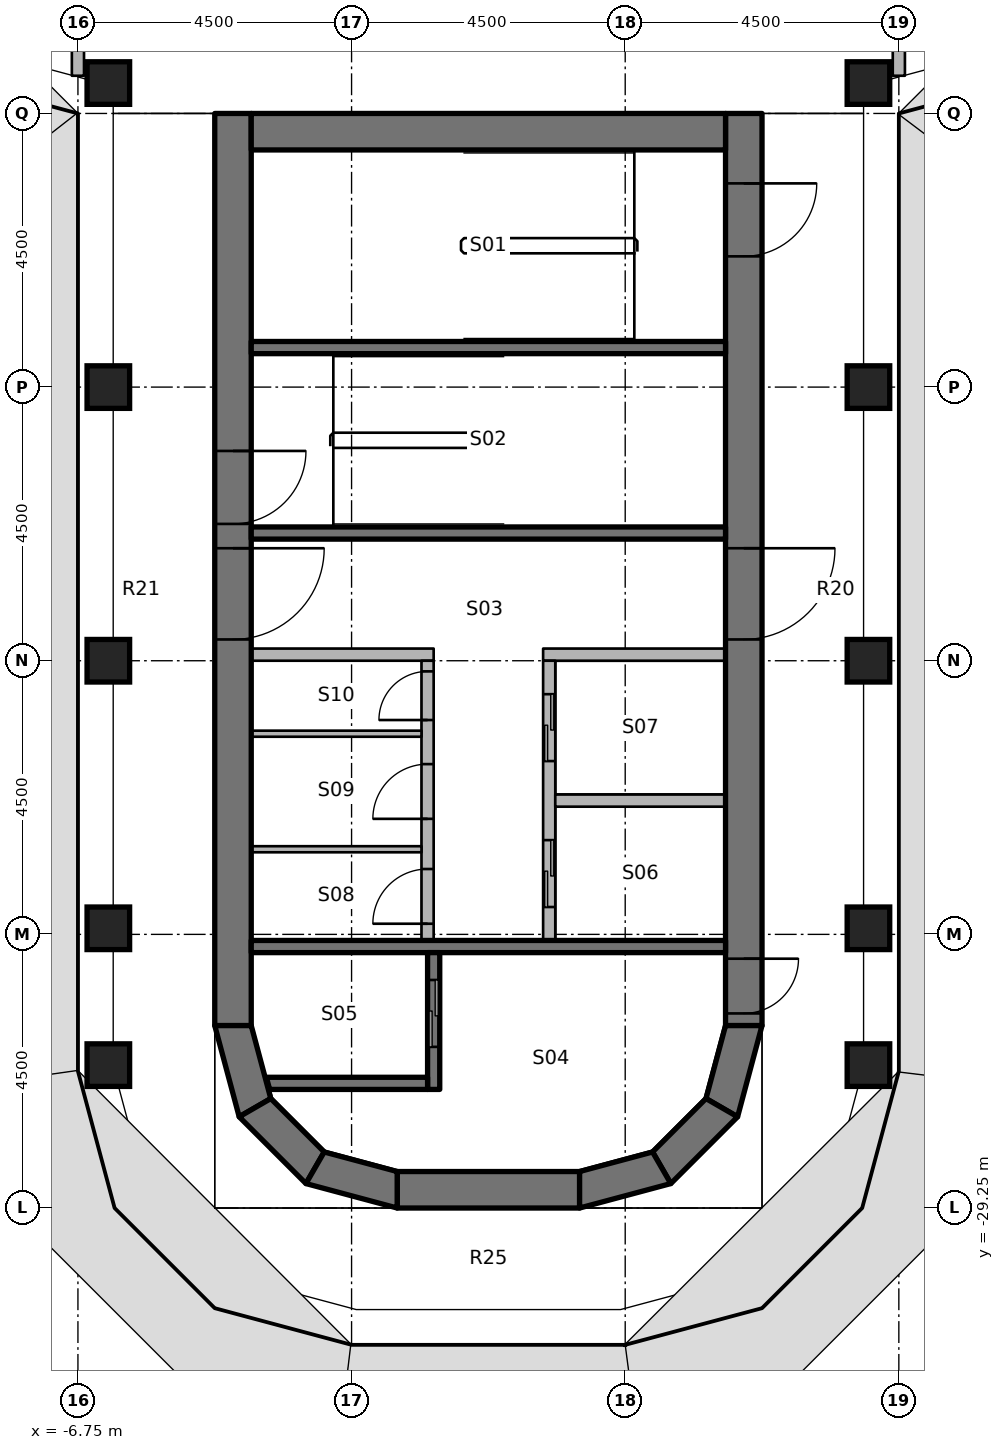
"""IFC4 building model, lengths in metres.
Left out: names, types, materials, properties, quantities, classifications, styles, units other than length and angle.
Written with IfcOpenShell. Run it as: python <this file> out.ifc"""

import sys

from ifc_helpers import new_model, si_unit, direction, frame, frame_2d, origin, origin_2d, place, context, subcontext, project, spatial, polyline, rectangle, outline, extrude, element, fill, save


model = new_model("IFC4")
c1 = context("Model", 3, precision=1e-05, world=origin(), true_north=direction((0.0, 1.0)))
c2 = subcontext(c1, "Body", "Model", "MODEL_VIEW")
j1 = project(units=[si_unit("LENGTHUNIT", "METRE"), si_unit("PLANEANGLEUNIT", "RADIAN")], contexts=[c1])
p1 = place(None, origin())
s1 = spatial("IfcSite", under=j1, at=p1, CompositionType="ELEMENT")
p2 = place(p1, origin())
s2 = spatial("IfcBuilding", under=s1, at=p2, CompositionType="ELEMENT")
p3 = place(p2, frame((0.0, 0.0, 233.4)))
s3 = spatial("IfcBuildingStorey", under=s2, at=p3, CompositionType="ELEMENT", Elevation=233.4)
for number, where, z_axis, x_axis in (
    (1, (-6.25, -26.9, 0.0), (0.0, 0.0, 1.0), (1.0, 0.0, 0.0)),
    (2, (-6.25, -24.65, 0.0), (0.0, 0.0, 1.0), (1.0, 0.0, 0.0)),
    (3, (-6.25, -20.25, 0.0), (0.0, 0.0, 1.0), (1.0, 0.0, 0.0)),
    (4, (-6.25, -15.75, 0.0), (0.0, 0.0, 1.0), (1.0, 0.0, 0.0)),
    (5, (-6.25, -10.75, 0.0), (0.0, 0.0, 1.0), (1.0, 0.0, 0.0)),
    (6, (6.25, -26.9, 0.0), (0.0, 0.0, 1.0), (1.0, 0.0, 0.0)),
    (7, (6.25, -24.65, 0.0), (0.0, 0.0, 1.0), (1.0, 0.0, 0.0)),
    (8, (6.25, -20.25, 0.0), (0.0, 0.0, 1.0), (1.0, 0.0, 0.0)),
    (9, (6.25, -15.75, 0.0), (0.0, 0.0, 1.0), (1.0, 0.0, 0.0)),
    (10, (6.25, -10.75, 0.0), (0.0, 0.0, 1.0), (1.0, 0.0, 0.0)),
):
    element("IfcColumn", number, at=place(p3, frame(where, z_axis=z_axis, x_axis=x_axis)), inside=s3, PredefinedType="COLUMN", context=c2, shape_type="SweptSolid", body=[
        extrude(rectangle(XDim=0.7, YDim=0.7, at=origin_2d()), origin(), (0.0, 0.0, 1.0), 3.65),
    ])
p4 = place(p3, frame((-4.2, -11.25, 0.0), z_axis=(0.0, 0.0, 1.0), x_axis=(0.0, -1.0, 0.0)))
e11 = element("IfcWall", 11, at=p4, inside=s3, PredefinedType="SHEAR", context=c2, shape_type="SweptSolid", body=[
    extrude(rectangle(XDim=15.0, YDim=0.6, at=frame_2d((7.5, 0.0))), origin(), (0.0, 0.0, 1.0), 3.8),
])
p5 = place(p4, frame((7.15, 0.0, 0.0)))
e12 = element("IfcOpeningElement", 12, at=p5, cuts=e11, PredefinedType="OPENING", context=c2, shape_type="SweptSolid", body=[
    extrude(rectangle(XDim=1.5, YDim=2.3, at=frame_2d((0.75, 1.15))), frame((0.0, 0.31, 0.0), z_axis=(0.0, -1.0, 0.0), x_axis=(1.0, 0.0, 0.0)), (0.0, 0.0, 1.0), 0.62),
])
p6 = place(p4, frame((5.55, 0.0, 0.0)))
e13 = element("IfcOpeningElement", 13, at=p6, cuts=e11, PredefinedType="OPENING", context=c2, shape_type="SweptSolid", body=[
    extrude(rectangle(XDim=1.2, YDim=2.1, at=frame_2d((0.6, 1.05))), frame((0.0, 0.31, 0.0), z_axis=(0.0, -1.0, 0.0), x_axis=(1.0, 0.0, 0.0)), (0.0, 0.0, 1.0), 0.62),
])
p7 = place(p3, frame((4.2, -11.25, 0.0), z_axis=(0.0, 0.0, 1.0), x_axis=(0.0, -1.0, 0.0)))
e14 = element("IfcWall", 14, at=p7, inside=s3, PredefinedType="SHEAR", context=c2, shape_type="SweptSolid", body=[
    extrude(rectangle(XDim=15.0, YDim=0.6, at=frame_2d((7.5, 0.0))), origin(), (0.0, 0.0, 1.0), 3.8),
])
p8 = place(p7, frame((7.15, 0.0, 0.0)))
e15 = element("IfcOpeningElement", 15, at=p8, cuts=e14, PredefinedType="OPENING", context=c2, shape_type="SweptSolid", body=[
    extrude(rectangle(XDim=1.5, YDim=2.3, at=frame_2d((0.75, 1.15))), frame((0.0, 0.31, 0.0), z_axis=(0.0, -1.0, 0.0), x_axis=(1.0, 0.0, 0.0)), (0.0, 0.0, 1.0), 0.62),
])
p9 = place(p7, frame((13.9, 0.0, 0.0)))
e16 = element("IfcOpeningElement", 16, at=p9, cuts=e14, PredefinedType="OPENING", context=c2, shape_type="SweptSolid", body=[
    extrude(rectangle(XDim=0.9, YDim=2.1, at=frame_2d((0.45, 1.05))), frame((0.0, 0.31, 0.0), z_axis=(0.0, -1.0, 0.0), x_axis=(1.0, 0.0, 0.0)), (0.0, 0.0, 1.0), 0.62),
])
p10 = place(p7, frame((1.15, 0.0, 0.0)))
e17 = element("IfcOpeningElement", 17, at=p10, cuts=e14, PredefinedType="OPENING", context=c2, shape_type="SweptSolid", body=[
    extrude(rectangle(XDim=1.2, YDim=2.1, at=frame_2d((0.6, 1.05))), frame((0.0, 0.31, 0.0), z_axis=(0.0, -1.0, 0.0), x_axis=(1.0, 0.0, 0.0)), (0.0, 0.0, 1.0), 0.62),
])
p11 = place(p3, frame((-3.9, -11.55, 0.0), z_axis=(0.0, 0.0, 1.0), x_axis=(1.0, 0.0, 0.0)))
e18 = element("IfcWall", 18, at=p11, inside=s3, PredefinedType="SHEAR", context=c2, shape_type="SweptSolid", body=[
    extrude(rectangle(XDim=7.8, YDim=0.6, at=frame_2d((3.9, 0.0))), origin(), (0.0, 0.0, 1.0), 3.8),
])
p12 = place(p3, frame((-1.5, -28.95, 0.0), z_axis=(0.0, 0.0, 1.0), x_axis=(1.0, 0.0, 0.0)))
e19 = element("IfcWall", 19, at=p12, inside=s3, PredefinedType="SHEAR", context=c2, shape_type="SweptSolid", body=[
    extrude(rectangle(XDim=3.0, YDim=0.6, at=frame_2d((1.5, 0.0))), origin(), (0.0, 0.0, 1.0), 3.8),
])
p13 = place(p3, origin())
e20 = element("IfcWall", 20, at=p13, inside=s3, PredefinedType="SHEAR", context=c2, shape_type="SweptSolid", body=[
    extrude(outline(polyline([(-4.5, -26.25), (-4.098, -27.75), (-3.579, -27.45), (-3.9, -26.25), (-4.5, -26.25)])), origin(), (0.0, 0.0, 1.0), 3.8),
])
p14 = place(p3, origin())
e21 = element("IfcWall", 21, at=p14, inside=s3, PredefinedType="SHEAR", context=c2, shape_type="SweptSolid", body=[
    extrude(outline(polyline([(-4.098, -27.75), (-3.0, -28.848), (-2.7, -28.329), (-3.579, -27.45), (-4.098, -27.75)])), origin(), (0.0, 0.0, 1.0), 3.8),
])
p15 = place(p3, origin())
e22 = element("IfcWall", 22, at=p15, inside=s3, PredefinedType="SHEAR", context=c2, shape_type="SweptSolid", body=[
    extrude(outline(polyline([(-3.0, -28.848), (-1.5, -29.25), (-1.5, -28.65), (-2.7, -28.329), (-3.0, -28.848)])), origin(), (0.0, 0.0, 1.0), 3.8),
])
p16 = place(p3, origin())
e23 = element("IfcWall", 23, at=p16, inside=s3, PredefinedType="SHEAR", context=c2, shape_type="SweptSolid", body=[
    extrude(outline(polyline([(4.5, -26.25), (4.098, -27.75), (3.579, -27.45), (3.9, -26.25), (4.5, -26.25)])), origin(), (0.0, 0.0, 1.0), 3.8),
])
p17 = place(p3, origin())
e24 = element("IfcWall", 24, at=p17, inside=s3, PredefinedType="SHEAR", context=c2, shape_type="SweptSolid", body=[
    extrude(outline(polyline([(4.098, -27.75), (3.0, -28.848), (2.7, -28.329), (3.579, -27.45), (4.098, -27.75)])), origin(), (0.0, 0.0, 1.0), 3.8),
])
p18 = place(p3, origin())
e25 = element("IfcWall", 25, at=p18, inside=s3, PredefinedType="SHEAR", context=c2, shape_type="SweptSolid", body=[
    extrude(outline(polyline([(3.0, -28.848), (1.5, -29.25), (1.5, -28.65), (2.7, -28.329), (3.0, -28.848)])), origin(), (0.0, 0.0, 1.0), 3.8),
])
p19 = place(p3, frame((3.9, -24.95, 0.0), z_axis=(0.0, 0.0, 1.0), x_axis=(-1.0, 0.0, 0.0)))
e26 = element("IfcWall", 26, at=p19, inside=s3, PredefinedType="SHEAR", context=c2, shape_type="SweptSolid", body=[
    extrude(rectangle(XDim=7.8, YDim=0.2, at=frame_2d((3.9, 0.0))), origin(), (0.0, 0.0, 1.0), 3.65),
])
p20 = place(p3, frame((-0.9, -27.3, 0.0), z_axis=(0.0, 0.0, 1.0), x_axis=(0.0, 1.0, 0.0)))
e27 = element("IfcWall", 27, at=p20, inside=s3, PredefinedType="SHEAR", context=c2, shape_type="SweptSolid", body=[
    extrude(rectangle(XDim=2.25, YDim=0.2, at=frame_2d((1.125, 0.0))), origin(), (0.0, 0.0, 1.0), 3.65),
])
p21 = place(p20, frame((0.7, 0.0, 0.0)))
e28 = element("IfcOpeningElement", 28, at=p21, cuts=e27, PredefinedType="OPENING", context=c2, shape_type="SweptSolid", body=[
    extrude(rectangle(XDim=1.1, YDim=2.3, at=frame_2d((0.55, 1.15))), frame((0.0, 0.11, 0.0), z_axis=(0.0, -1.0, 0.0), x_axis=(1.0, 0.0, 0.0)), (0.0, 0.0, 1.0), 0.22),
])
p22 = place(p3, origin())
e29 = element("IfcWall", 29, at=p22, inside=s3, PredefinedType="SHEAR", context=c2, shape_type="SweptSolid", body=[
    extrude(outline(polyline([(-1.0, -27.1), (-3.651, -27.1), (-3.597, -27.3), (-1.0, -27.3), (-1.0, -27.1)])), origin(), (0.0, 0.0, 1.0), 3.65),
])
for number, where, z_axis, x_axis in (
    (30, (3.9, -18.15, 0.0), (0.0, 0.0, 1.0), (-1.0, 0.0, 0.0)),
    (31, (3.9, -15.1, 0.0), (0.0, 0.0, 1.0), (-1.0, 0.0, 0.0)),
):
    element("IfcWall", number, at=place(p3, frame(where, z_axis=z_axis, x_axis=x_axis)), inside=s3, PredefinedType="SHEAR", context=c2, shape_type="SweptSolid", body=[
        extrude(rectangle(XDim=7.8, YDim=0.2, at=frame_2d((3.9, 0.0))), origin(), (0.0, 0.0, 1.0), 3.65),
    ])
p23 = place(p3, frame((3.9, -20.15, 0.0), z_axis=(0.0, 0.0, 1.0), x_axis=(-1.0, 0.0, 0.0)))
e32 = element("IfcWall", 32, at=p23, inside=s3, PredefinedType="PARTITIONING", context=c2, shape_type="SweptSolid", body=[
    extrude(rectangle(XDim=3.0, YDim=0.2, at=frame_2d((1.5, 0.0))), origin(), (0.0, 0.0, 1.0), 3.65),
])
p24 = place(p3, frame((1.0, -24.85, 0.0), z_axis=(0.0, 0.0, 1.0), x_axis=(0.0, 1.0, 0.0)))
e33 = element("IfcWall", 33, at=p24, inside=s3, PredefinedType="PARTITIONING", context=c2, shape_type="SweptSolid", body=[
    extrude(rectangle(XDim=4.6, YDim=0.2, at=frame_2d((2.3, 0.0))), origin(), (0.0, 0.0, 1.0), 3.65),
])
p25 = place(p24, frame((0.55, 0.0, 0.0)))
e34 = element("IfcOpeningElement", 34, at=p25, cuts=e33, PredefinedType="OPENING", context=c2, shape_type="SweptSolid", body=[
    extrude(rectangle(XDim=1.1, YDim=2.3, at=frame_2d((0.55, 1.15))), frame((0.0, 0.11, 0.0), z_axis=(0.0, -1.0, 0.0), x_axis=(1.0, 0.0, 0.0)), (0.0, 0.0, 1.0), 0.22),
])
p26 = place(p24, frame((2.95, 0.0, 0.0)))
e35 = element("IfcOpeningElement", 35, at=p26, cuts=e33, PredefinedType="OPENING", context=c2, shape_type="SweptSolid", body=[
    extrude(rectangle(XDim=1.1, YDim=2.3, at=frame_2d((0.55, 1.15))), frame((0.0, 0.11, 0.0), z_axis=(0.0, -1.0, 0.0), x_axis=(1.0, 0.0, 0.0)), (0.0, 0.0, 1.0), 0.22),
])
p27 = place(p3, frame((-0.9, -20.15, 0.0), z_axis=(0.0, 0.0, 1.0), x_axis=(-1.0, 0.0, 0.0)))
e36 = element("IfcWall", 36, at=p27, inside=s3, PredefinedType="PARTITIONING", context=c2, shape_type="SweptSolid", body=[
    extrude(rectangle(XDim=3.0, YDim=0.2, at=frame_2d((1.5, 0.0))), origin(), (0.0, 0.0, 1.0), 3.65),
])
p28 = place(p3, frame((-1.0, -24.85, 0.0), z_axis=(0.0, 0.0, 1.0), x_axis=(0.0, 1.0, 0.0)))
e37 = element("IfcWall", 37, at=p28, inside=s3, PredefinedType="PARTITIONING", context=c2, shape_type="SweptSolid", body=[
    extrude(rectangle(XDim=4.6, YDim=0.2, at=frame_2d((2.3, 0.0))), origin(), (0.0, 0.0, 1.0), 3.65),
])
p29 = place(p28, frame((0.275, 0.0, 0.0)))
e38 = element("IfcOpeningElement", 38, at=p29, cuts=e37, PredefinedType="OPENING", context=c2, shape_type="SweptSolid", body=[
    extrude(rectangle(XDim=0.9, YDim=2.1, at=frame_2d((0.45, 1.05))), frame((0.0, 0.11, 0.0), z_axis=(0.0, -1.0, 0.0), x_axis=(1.0, 0.0, 0.0)), (0.0, 0.0, 1.0), 0.22),
])
p30 = place(p28, frame((2.0, 0.0, 0.0)))
e39 = element("IfcOpeningElement", 39, at=p30, cuts=e37, PredefinedType="OPENING", context=c2, shape_type="SweptSolid", body=[
    extrude(rectangle(XDim=0.9, YDim=2.1, at=frame_2d((0.45, 1.05))), frame((0.0, 0.11, 0.0), z_axis=(0.0, -1.0, 0.0), x_axis=(1.0, 0.0, 0.0)), (0.0, 0.0, 1.0), 0.22),
])
p31 = place(p28, frame((3.625, 0.0, 0.0)))
e40 = element("IfcOpeningElement", 40, at=p31, cuts=e37, PredefinedType="OPENING", context=c2, shape_type="SweptSolid", body=[
    extrude(rectangle(XDim=0.8, YDim=2.1, at=frame_2d((0.4, 1.05))), frame((0.0, 0.11, 0.0), z_axis=(0.0, -1.0, 0.0), x_axis=(1.0, 0.0, 0.0)), (0.0, 0.0, 1.0), 0.22),
])
p32 = place(p3, frame((3.9, -22.55, 0.0), z_axis=(0.0, 0.0, 1.0), x_axis=(-1.0, 0.0, 0.0)))
e41 = element("IfcWall", 41, at=p32, inside=s3, PredefinedType="PARTITIONING", context=c2, shape_type="SweptSolid", body=[
    extrude(rectangle(XDim=2.8, YDim=0.2, at=frame_2d((1.4, 0.0))), origin(), (0.0, 0.0, 1.0), 3.65),
])
for number, where, z_axis, x_axis in (
    (42, (-1.1, -23.35, 0.0), (0.0, 0.0, 1.0), (-1.0, 0.0, 0.0)),
    (43, (-1.1, -21.45, 0.0), (0.0, 0.0, 1.0), (-1.0, 0.0, 0.0)),
):
    element("IfcWall", number, at=place(p3, frame(where, z_axis=z_axis, x_axis=x_axis)), inside=s3, PredefinedType="PARTITIONING", context=c2, shape_type="SweptSolid", body=[
        extrude(rectangle(XDim=2.8, YDim=0.1, at=frame_2d((1.4, 0.0))), origin(), (0.0, 0.0, 1.0), 3.65),
    ])
p33 = place(p3, frame((6.75, -10.63, 0.0), z_axis=(0.0, 0.0, 1.0), x_axis=(0.0, 1.0, 0.0)))
e44 = element("IfcWall", 44, at=p33, inside=s3, PredefinedType="PARTITIONING", context=c2, shape_type="SweptSolid", body=[
    extrude(rectangle(XDim=3.78, YDim=0.2, at=frame_2d((1.89, 0.0))), origin(), (0.0, 0.0, 1.0), 2.746),
])
p34 = place(p3, frame((-6.75, -10.63, 0.0), z_axis=(0.0, 0.0, 1.0), x_axis=(0.0, 1.0, 0.0)))
e45 = element("IfcWall", 45, at=p34, inside=s3, PredefinedType="PARTITIONING", context=c2, shape_type="SweptSolid", body=[
    extrude(rectangle(XDim=3.78, YDim=0.2, at=frame_2d((1.89, 0.0))), origin(), (0.0, 0.0, 1.0), 2.746),
])
p35 = place(p34, frame((1.44, 0.0, 0.0)))
e46 = element("IfcOpeningElement", 46, at=p35, cuts=e45, PredefinedType="OPENING", context=c2, shape_type="SweptSolid", body=[
    extrude(rectangle(XDim=0.9, YDim=2.1, at=frame_2d((0.45, 1.05))), frame((0.0, 0.11, 0.0), z_axis=(0.0, -1.0, 0.0), x_axis=(1.0, 0.0, 0.0)), (0.0, 0.0, 1.0), 0.22),
])
p36 = place(p8, origin())
e47 = element("IfcDoor", 47, at=p36, inside=s3, OperationType="DOUBLE_DOOR_SINGLE_SWING", PredefinedType="DOOR", context=c2, shape_type="SweptSolid", body=[
    extrude(rectangle(XDim=1.5, YDim=2.3, at=frame_2d((0.75, 1.15))), frame((0.0, 0.025, 0.0), z_axis=(0.0, -1.0, 0.0), x_axis=(1.0, 0.0, 0.0)), (0.0, 0.0, 1.0), 0.05),
])
fill(e15, e47)
p37 = place(p5, origin())
e48 = element("IfcDoor", 48, at=p37, inside=s3, OperationType="DOUBLE_DOOR_SINGLE_SWING", PredefinedType="DOOR", context=c2, shape_type="SweptSolid", body=[
    extrude(rectangle(XDim=1.5, YDim=2.3, at=frame_2d((0.75, 1.15))), frame((0.0, 0.025, 0.0), z_axis=(0.0, -1.0, 0.0), x_axis=(1.0, 0.0, 0.0)), (0.0, 0.0, 1.0), 0.05),
])
fill(e12, e48)
p38 = place(p9, origin())
e49 = element("IfcDoor", 49, at=p38, inside=s3, OperationType="SINGLE_SWING_LEFT", PredefinedType="DOOR", context=c2, shape_type="SweptSolid", body=[
    extrude(rectangle(XDim=0.9, YDim=2.1, at=frame_2d((0.45, 1.05))), frame((0.0, 0.025, 0.0), z_axis=(0.0, -1.0, 0.0), x_axis=(1.0, 0.0, 0.0)), (0.0, 0.0, 1.0), 0.05),
])
fill(e16, e49)
p39 = place(p6, origin())
e50 = element("IfcDoor", 50, at=p39, inside=s3, OperationType="SINGLE_SWING_RIGHT", PredefinedType="DOOR", context=c2, shape_type="SweptSolid", body=[
    extrude(rectangle(XDim=1.2, YDim=2.1, at=frame_2d((0.6, 1.05))), frame((0.0, 0.025, 0.0), z_axis=(0.0, -1.0, 0.0), x_axis=(1.0, 0.0, 0.0)), (0.0, 0.0, 1.0), 0.05),
])
fill(e13, e50)
p40 = place(p10, origin())
e51 = element("IfcDoor", 51, at=p40, inside=s3, OperationType="SINGLE_SWING_LEFT", PredefinedType="DOOR", context=c2, shape_type="SweptSolid", body=[
    extrude(rectangle(XDim=1.2, YDim=2.1, at=frame_2d((0.6, 1.05))), frame((0.0, 0.025, 0.0), z_axis=(0.0, -1.0, 0.0), x_axis=(1.0, 0.0, 0.0)), (0.0, 0.0, 1.0), 0.05),
])
fill(e17, e51)
p41 = place(p21, origin())
e52 = element("IfcDoor", 52, at=p41, inside=s3, OperationType="DOUBLE_DOOR_SLIDING", PredefinedType="DOOR", context=c2, shape_type="SweptSolid", body=[
    extrude(rectangle(XDim=1.1, YDim=2.3, at=frame_2d((0.55, 1.15))), frame((0.0, 0.025, 0.0), z_axis=(0.0, -1.0, 0.0), x_axis=(1.0, 0.0, 0.0)), (0.0, 0.0, 1.0), 0.05),
])
fill(e28, e52)
p42 = place(p25, origin())
e53 = element("IfcDoor", 53, at=p42, inside=s3, OperationType="DOUBLE_DOOR_SLIDING", PredefinedType="DOOR", context=c2, shape_type="SweptSolid", body=[
    extrude(rectangle(XDim=1.1, YDim=2.3, at=frame_2d((0.55, 1.15))), frame((0.0, 0.025, 0.0), z_axis=(0.0, -1.0, 0.0), x_axis=(1.0, 0.0, 0.0)), (0.0, 0.0, 1.0), 0.05),
])
fill(e34, e53)
p43 = place(p26, origin())
e54 = element("IfcDoor", 54, at=p43, inside=s3, OperationType="DOUBLE_DOOR_SLIDING", PredefinedType="DOOR", context=c2, shape_type="SweptSolid", body=[
    extrude(rectangle(XDim=1.1, YDim=2.3, at=frame_2d((0.55, 1.15))), frame((0.0, 0.025, 0.0), z_axis=(0.0, -1.0, 0.0), x_axis=(1.0, 0.0, 0.0)), (0.0, 0.0, 1.0), 0.05),
])
fill(e35, e54)
p44 = place(p29, origin())
e55 = element("IfcDoor", 55, at=p44, inside=s3, OperationType="SINGLE_SWING_LEFT", PredefinedType="DOOR", context=c2, shape_type="SweptSolid", body=[
    extrude(rectangle(XDim=0.9, YDim=2.1, at=frame_2d((0.45, 1.05))), frame((0.0, 0.025, 0.0), z_axis=(0.0, -1.0, 0.0), x_axis=(1.0, 0.0, 0.0)), (0.0, 0.0, 1.0), 0.05),
])
fill(e38, e55)
p45 = place(p30, origin())
e56 = element("IfcDoor", 56, at=p45, inside=s3, OperationType="SINGLE_SWING_LEFT", PredefinedType="DOOR", context=c2, shape_type="SweptSolid", body=[
    extrude(rectangle(XDim=0.9, YDim=2.1, at=frame_2d((0.45, 1.05))), frame((0.0, 0.025, 0.0), z_axis=(0.0, -1.0, 0.0), x_axis=(1.0, 0.0, 0.0)), (0.0, 0.0, 1.0), 0.05),
])
fill(e39, e56)
p46 = place(p31, origin())
e57 = element("IfcDoor", 57, at=p46, inside=s3, OperationType="SINGLE_SWING_RIGHT", PredefinedType="DOOR", context=c2, shape_type="SweptSolid", body=[
    extrude(rectangle(XDim=0.8, YDim=2.1, at=frame_2d((0.4, 1.05))), frame((0.0, 0.025, 0.0), z_axis=(0.0, -1.0, 0.0), x_axis=(1.0, 0.0, 0.0)), (0.0, 0.0, 1.0), 0.05),
])
fill(e40, e57)
save(model, sys.argv[1])
